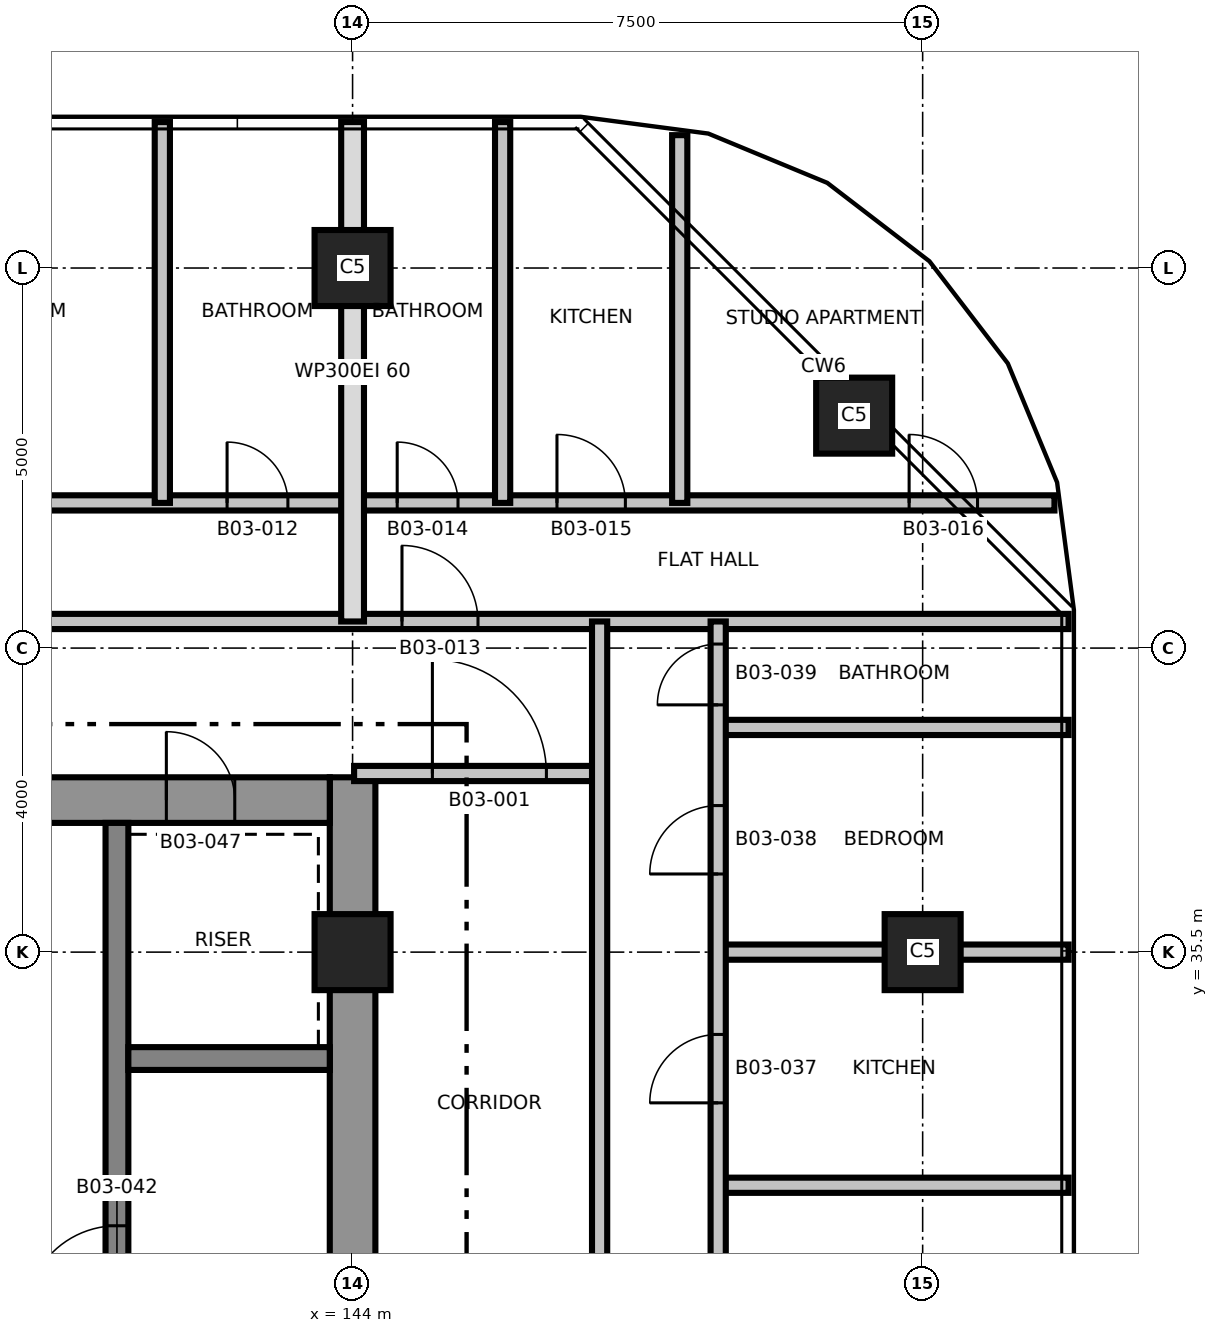
"""IFC4 building model, lengths in metres.
Left out: names, types, materials, properties, quantities, classifications, styles, units other than length and angle.
Written with IfcOpenShell. Run it as: python <this file> out.ifc"""

import sys

from ifc_helpers import new_model, si_unit, direction, frame, frame_2d, origin, origin_2d, place, context, subcontext, project, spatial, rectangle, extrude, element, fill, save


model = new_model("IFC4")
c1 = context("Model", 3, precision=1e-05, world=origin(), true_north=direction((0.0, 1.0)))
c2 = subcontext(c1, "Body", "Model", "MODEL_VIEW")
j1 = project(units=[si_unit("LENGTHUNIT", "METRE"), si_unit("PLANEANGLEUNIT", "RADIAN")], contexts=[c1])
p1 = place(None, origin())
s1 = spatial("IfcSite", under=j1, at=p1, CompositionType="ELEMENT")
p2 = place(p1, origin())
s2 = spatial("IfcBuilding", under=s1, at=p2, CompositionType="ELEMENT")
p3 = place(p2, frame((0.0, 0.0, 52.0)))
s3 = spatial("IfcBuildingStorey", under=s2, at=p3, CompositionType="ELEMENT", Elevation=52.0)
p4 = place(p3, frame((144.0, 24.2, 0.0), z_axis=(0.0, 0.0, 1.0), x_axis=(0.0, 1.0, 0.0)))
e1 = element("IfcWall", 1, at=p4, inside=s3, PredefinedType="SHEAR", context=c2, shape_type="SweptSolid", body=[
    extrude(rectangle(XDim=13.6, YDim=0.6, at=frame_2d((6.8, 0.0))), origin(), (0.0, 0.0, 1.0), 3.7),
])
p5 = place(p3, frame((128.7, 37.5, 0.0), z_axis=(0.0, 0.0, 1.0), x_axis=(1.0, 0.0, 0.0)))
e2 = element("IfcWall", 2, at=p5, inside=s3, PredefinedType="SHEAR", context=c2, shape_type="SweptSolid", body=[
    extrude(rectangle(XDim=15.0, YDim=0.6, at=frame_2d((7.5, 0.0))), origin(), (0.0, 0.0, 1.0), 3.7),
])
p6 = place(p5, frame((9.65, 0.0, 0.0)))
e3 = element("IfcOpeningElement", 3, at=p6, cuts=e2, PredefinedType="OPENING", context=c2, shape_type="SweptSolid", body=[
    extrude(rectangle(XDim=1.5, YDim=2.1, at=frame_2d((0.75, 1.05))), frame((0.0, 0.31, 0.0), z_axis=(0.0, -1.0, 0.0), x_axis=(1.0, 0.0, 0.0)), (0.0, 0.0, 1.0), 0.62),
])
p7 = place(p5, frame((12.85, 0.0, 0.0)))
e4 = element("IfcOpeningElement", 4, at=p7, cuts=e2, PredefinedType="OPENING", context=c2, shape_type="SweptSolid", body=[
    extrude(rectangle(XDim=0.9, YDim=2.1, at=frame_2d((0.45, 1.05))), frame((0.0, 0.31, 0.0), z_axis=(0.0, -1.0, 0.0), x_axis=(1.0, 0.0, 0.0)), (0.0, 0.0, 1.0), 0.62),
])
p8 = place(p5, frame((3.8, 0.0, 0.0)))
e5 = element("IfcOpeningElement", 5, at=p8, cuts=e2, PredefinedType="OPENING", context=c2, shape_type="SweptSolid", body=[
    extrude(rectangle(XDim=0.9, YDim=2.1, at=frame_2d((0.45, 1.05))), frame((0.0, 0.31, 0.0), z_axis=(0.0, -1.0, 0.0), x_axis=(1.0, 0.0, 0.0)), (0.0, 0.0, 1.0), 0.62),
])
p9 = place(p5, frame((6.7, 0.0, 0.0)))
e6 = element("IfcOpeningElement", 6, at=p9, cuts=e2, PredefinedType="OPENING", context=c2, shape_type="SweptSolid", body=[
    extrude(rectangle(XDim=0.9, YDim=2.1, at=frame_2d((0.45, 1.05))), frame((0.0, 0.31, 0.0), z_axis=(0.0, -1.0, 0.0), x_axis=(1.0, 0.0, 0.0)), (0.0, 0.0, 1.0), 0.62),
])
p10 = place(p3, frame((140.9, 24.8, 0.0), z_axis=(0.0, 0.0, 1.0), x_axis=(0.0, 1.0, 0.0)))
e7 = element("IfcWall", 7, at=p10, inside=s3, PredefinedType="SHEAR", context=c2, shape_type="SweptSolid", body=[
    extrude(rectangle(XDim=12.4, YDim=0.3, at=frame_2d((6.2, 0.0))), origin(), (0.0, 0.0, 1.0), 3.7),
])
p11 = place(p10, frame((5.9, 0.0, 0.0)))
e8 = element("IfcOpeningElement", 8, at=p11, cuts=e7, PredefinedType="OPENING", context=c2, shape_type="SweptSolid", body=[
    extrude(rectangle(XDim=1.2, YDim=2.1, at=frame_2d((0.6, 1.05))), frame((0.0, 0.16, 0.0), z_axis=(0.0, -1.0, 0.0), x_axis=(1.0, 0.0, 0.0)), (0.0, 0.0, 1.0), 0.32),
])
p12 = place(p3, frame((141.05, 34.1, 0.0), z_axis=(0.0, 0.0, 1.0), x_axis=(1.0, 0.0, 0.0)))
e9 = element("IfcWall", 9, at=p12, inside=s3, PredefinedType="SHEAR", context=c2, shape_type="SweptSolid", body=[
    extrude(rectangle(XDim=2.65, YDim=0.3, at=frame_2d((1.325, 0.0))), origin(), (0.0, 0.0, 1.0), 3.7),
])
for number, where, z_axis, x_axis in (
    (10, (144.0, 35.5, 0.0), (0.0, 0.0, 1.0), (1.0, 0.0, 0.0)),
    (11, (151.5, 35.5, 0.0), (0.0, 0.0, 1.0), (1.0, 0.0, 0.0)),
    (12, (150.599, 42.558, 0.0), (0.0, 0.0, 1.0), (1.0, 0.0, 0.0)),
    (13, (144.0, 44.5, 0.0), (0.0, 0.0, 1.0), (1.0, 0.0, 0.0)),
):
    element("IfcColumn", number, at=place(p3, frame(where, z_axis=z_axis, x_axis=x_axis)), inside=s3, PredefinedType="COLUMN", context=c2, shape_type="SweptSolid", body=[
        extrude(rectangle(XDim=1.0, YDim=1.0, at=origin_2d()), origin(), (0.0, 0.0, 1.0), 3.7),
    ])
for number, where, z_axis, x_axis in (
    (14, (148.81, 32.433, 0.0), (0.0, 0.0, 1.0), (1.0, 0.0, 0.0)),
    (15, (148.81, 35.5, 0.0), (0.0, 0.0, 1.0), (1.0, 0.0, 0.0)),
):
    element("IfcWall", number, at=place(p3, frame(where, z_axis=z_axis, x_axis=x_axis)), inside=s3, PredefinedType="PARTITIONING", context=c2, shape_type="SweptSolid", body=[
        extrude(rectangle(XDim=4.61, YDim=0.2, at=frame_2d((2.305, 0.0))), origin(), (0.0, 0.0, 1.0), 3.4),
    ])
p13 = place(p3, frame((144.02, 37.85, 0.0), z_axis=(0.0, 0.0, 1.0), x_axis=(1.0, 0.0, 0.0)))
e16 = element("IfcWall", 16, at=p13, inside=s3, PredefinedType="PARTITIONING", context=c2, shape_type="SweptSolid", body=[
    extrude(rectangle(XDim=3.23, YDim=0.2, at=frame_2d((1.615, 0.0))), origin(), (0.0, 0.0, 1.0), 3.4),
])
p14 = place(p13, frame((1.03, 0.0, 0.0)))
e17 = element("IfcOpeningElement", 17, at=p14, cuts=e16, PredefinedType="OPENING", context=c2, shape_type="SweptSolid", body=[
    extrude(rectangle(XDim=1.5, YDim=2.1, at=frame_2d((0.75, 1.05))), frame((0.0, 0.11, 0.0), z_axis=(0.0, -1.0, 0.0), x_axis=(1.0, 0.0, 0.0)), (0.0, 0.0, 1.0), 0.22),
])
p15 = place(p3, frame((148.81, 38.456, 0.0), z_axis=(0.0, 0.0, 1.0), x_axis=(1.0, 0.0, 0.0)))
e18 = element("IfcWall", 18, at=p15, inside=s3, PredefinedType="PARTITIONING", context=c2, shape_type="SweptSolid", body=[
    extrude(rectangle(XDim=4.61, YDim=0.2, at=frame_2d((2.305, 0.0))), origin(), (0.0, 0.0, 1.0), 3.4),
])
p16 = place(p3, frame((119.58, 39.85, 0.0), z_axis=(0.0, 0.0, 1.0), x_axis=(1.0, 0.0, 0.0)))
e19 = element("IfcWall", 19, at=p16, inside=s3, PredefinedType="PARTITIONING", context=c2, shape_type="SweptSolid", body=[
    extrude(rectangle(XDim=33.84, YDim=0.2, at=frame_2d((16.92, 0.0))), origin(), (0.0, 0.0, 1.0), 3.4),
])
p17 = place(p16, frame((15.27, 0.0, 0.0)))
e20 = element("IfcOpeningElement", 20, at=p17, cuts=e19, PredefinedType="OPENING", context=c2, shape_type="SweptSolid", body=[
    extrude(rectangle(XDim=1.0, YDim=2.1, at=frame_2d((0.5, 1.05))), frame((0.0, 0.11, 0.0), z_axis=(0.0, -1.0, 0.0), x_axis=(1.0, 0.0, 0.0)), (0.0, 0.0, 1.0), 0.22),
])
p18 = place(p16, frame((25.07, 0.0, 0.0)))
e21 = element("IfcOpeningElement", 21, at=p18, cuts=e19, PredefinedType="OPENING", context=c2, shape_type="SweptSolid", body=[
    extrude(rectangle(XDim=1.0, YDim=2.1, at=frame_2d((0.5, 1.05))), frame((0.0, 0.11, 0.0), z_axis=(0.0, -1.0, 0.0), x_axis=(1.0, 0.0, 0.0)), (0.0, 0.0, 1.0), 0.22),
])
p19 = place(p3, frame((119.766, 41.41, 0.0), z_axis=(0.0, 0.0, 1.0), x_axis=(1.0, 0.0, 0.0)))
e22 = element("IfcWall", 22, at=p19, inside=s3, PredefinedType="PARTITIONING", context=c2, shape_type="SweptSolid", body=[
    extrude(rectangle(XDim=33.468, YDim=0.2, at=frame_2d((16.734, 0.0))), origin(), (0.0, 0.0, 1.0), 3.4),
])
p20 = place(p19, frame((1.017, 0.0, 0.0)))
e23 = element("IfcOpeningElement", 23, at=p20, cuts=e22, PredefinedType="OPENING", context=c2, shape_type="SweptSolid", body=[
    extrude(rectangle(XDim=0.9, YDim=2.1, at=frame_2d((0.45, 1.05))), frame((0.0, 0.11, 0.0), z_axis=(0.0, -1.0, 0.0), x_axis=(1.0, 0.0, 0.0)), (0.0, 0.0, 1.0), 0.22),
])
p21 = place(p19, frame((4.888, 0.0, 0.0)))
e24 = element("IfcOpeningElement", 24, at=p21, cuts=e22, PredefinedType="OPENING", context=c2, shape_type="SweptSolid", body=[
    extrude(rectangle(XDim=0.9, YDim=2.1, at=frame_2d((0.45, 1.05))), frame((0.0, 0.11, 0.0), z_axis=(0.0, -1.0, 0.0), x_axis=(1.0, 0.0, 0.0)), (0.0, 0.0, 1.0), 0.22),
])
p22 = place(p19, frame((7.835, 0.0, 0.0)))
e25 = element("IfcOpeningElement", 25, at=p22, cuts=e22, PredefinedType="OPENING", context=c2, shape_type="SweptSolid", body=[
    extrude(rectangle(XDim=0.8, YDim=2.1, at=frame_2d((0.4, 1.05))), frame((0.0, 0.11, 0.0), z_axis=(0.0, -1.0, 0.0), x_axis=(1.0, 0.0, 0.0)), (0.0, 0.0, 1.0), 0.22),
])
p23 = place(p19, frame((11.251, 0.0, 0.0)))
e26 = element("IfcOpeningElement", 26, at=p23, cuts=e22, PredefinedType="OPENING", context=c2, shape_type="SweptSolid", body=[
    extrude(rectangle(XDim=0.9, YDim=2.1, at=frame_2d((0.45, 1.05))), frame((0.0, 0.11, 0.0), z_axis=(0.0, -1.0, 0.0), x_axis=(1.0, 0.0, 0.0)), (0.0, 0.0, 1.0), 0.22),
])
p24 = place(p19, frame((15.001, 0.0, 0.0)))
e27 = element("IfcOpeningElement", 27, at=p24, cuts=e22, PredefinedType="OPENING", context=c2, shape_type="SweptSolid", body=[
    extrude(rectangle(XDim=0.9, YDim=2.1, at=frame_2d((0.45, 1.05))), frame((0.0, 0.11, 0.0), z_axis=(0.0, -1.0, 0.0), x_axis=(1.0, 0.0, 0.0)), (0.0, 0.0, 1.0), 0.22),
])
p25 = place(p19, frame((18.783, 0.0, 0.0)))
e28 = element("IfcOpeningElement", 28, at=p25, cuts=e22, PredefinedType="OPENING", context=c2, shape_type="SweptSolid", body=[
    extrude(rectangle(XDim=0.9, YDim=2.1, at=frame_2d((0.45, 1.05))), frame((0.0, 0.11, 0.0), z_axis=(0.0, -1.0, 0.0), x_axis=(1.0, 0.0, 0.0)), (0.0, 0.0, 1.0), 0.22),
])
p26 = place(p19, frame((22.583, 0.0, 0.0)))
e29 = element("IfcOpeningElement", 29, at=p26, cuts=e22, PredefinedType="OPENING", context=c2, shape_type="SweptSolid", body=[
    extrude(rectangle(XDim=0.8, YDim=2.1, at=frame_2d((0.4, 1.05))), frame((0.0, 0.11, 0.0), z_axis=(0.0, -1.0, 0.0), x_axis=(1.0, 0.0, 0.0)), (0.0, 0.0, 1.0), 0.22),
])
p27 = place(p19, frame((24.821, 0.0, 0.0)))
e30 = element("IfcOpeningElement", 30, at=p27, cuts=e22, PredefinedType="OPENING", context=c2, shape_type="SweptSolid", body=[
    extrude(rectangle(XDim=0.8, YDim=2.1, at=frame_2d((0.4, 1.05))), frame((0.0, 0.11, 0.0), z_axis=(0.0, -1.0, 0.0), x_axis=(1.0, 0.0, 0.0)), (0.0, 0.0, 1.0), 0.22),
])
p28 = place(p19, frame((26.923, 0.0, 0.0)))
e31 = element("IfcOpeningElement", 31, at=p28, cuts=e22, PredefinedType="OPENING", context=c2, shape_type="SweptSolid", body=[
    extrude(rectangle(XDim=0.9, YDim=2.1, at=frame_2d((0.45, 1.05))), frame((0.0, 0.11, 0.0), z_axis=(0.0, -1.0, 0.0), x_axis=(1.0, 0.0, 0.0)), (0.0, 0.0, 1.0), 0.22),
])
p29 = place(p19, frame((31.556, 0.0, 0.0)))
e32 = element("IfcOpeningElement", 32, at=p29, cuts=e22, PredefinedType="OPENING", context=c2, shape_type="SweptSolid", body=[
    extrude(rectangle(XDim=0.9, YDim=2.1, at=frame_2d((0.45, 1.05))), frame((0.0, 0.11, 0.0), z_axis=(0.0, -1.0, 0.0), x_axis=(1.0, 0.0, 0.0)), (0.0, 0.0, 1.0), 0.22),
])
p30 = place(p3, frame((141.497, 41.41, 0.0), z_axis=(0.0, 0.0, 1.0), x_axis=(0.0, 1.0, 0.0)))
e33 = element("IfcWall", 33, at=p30, inside=s3, PredefinedType="PARTITIONING", context=c2, shape_type="SweptSolid", body=[
    extrude(rectangle(XDim=5.01, YDim=0.2, at=frame_2d((2.505, 0.0))), origin(), (0.0, 0.0, 1.0), 3.4),
])
p31 = place(p3, frame((144.0, 39.85, 0.0), z_axis=(0.0, 0.0, 1.0), x_axis=(0.0, 1.0, 0.0)))
e34 = element("IfcWall", 34, at=p31, inside=s3, PredefinedType="PARTITIONING", context=c2, shape_type="SweptSolid", body=[
    extrude(rectangle(XDim=6.57, YDim=0.3, at=frame_2d((3.285, 0.0))), origin(), (0.0, 0.0, 1.0), 3.4),
])
p32 = place(p3, frame((145.974, 41.41, 0.0), z_axis=(0.0, 0.0, 1.0), x_axis=(0.0, 1.0, 0.0)))
e35 = element("IfcWall", 35, at=p32, inside=s3, PredefinedType="PARTITIONING", context=c2, shape_type="SweptSolid", body=[
    extrude(rectangle(XDim=5.01, YDim=0.2, at=frame_2d((2.505, 0.0))), origin(), (0.0, 0.0, 1.0), 3.4),
])
p33 = place(p3, frame((147.25, 22.15, 0.0), z_axis=(0.0, 0.0, 1.0), x_axis=(0.0, 1.0, 0.0)))
e36 = element("IfcWall", 36, at=p33, inside=s3, PredefinedType="PARTITIONING", context=c2, shape_type="SweptSolid", body=[
    extrude(rectangle(XDim=17.7, YDim=0.2, at=frame_2d((8.85, 0.0))), origin(), (0.0, 0.0, 1.0), 3.4),
])
p34 = place(p33, frame((2.65, 0.0, 0.0)))
e37 = element("IfcOpeningElement", 37, at=p34, cuts=e36, PredefinedType="OPENING", context=c2, shape_type="SweptSolid", body=[
    extrude(rectangle(XDim=1.0, YDim=2.1, at=frame_2d((0.5, 1.05))), frame((0.0, 0.11, 0.0), z_axis=(0.0, -1.0, 0.0), x_axis=(1.0, 0.0, 0.0)), (0.0, 0.0, 1.0), 0.22),
])
p35 = place(p3, frame((148.304, 41.41, 0.0), z_axis=(0.0, 0.0, 1.0), x_axis=(0.0, 1.0, 0.0)))
e38 = element("IfcWall", 38, at=p35, inside=s3, PredefinedType="PARTITIONING", context=c2, shape_type="SweptSolid", body=[
    extrude(rectangle(XDim=4.838, YDim=0.2, at=frame_2d((2.419, 0.0))), origin(), (0.0, 0.0, 1.0), 3.4),
])
p36 = place(p3, frame((148.81, 22.15, 0.0), z_axis=(0.0, 0.0, 1.0), x_axis=(0.0, 1.0, 0.0)))
e39 = element("IfcWall", 39, at=p36, inside=s3, PredefinedType="PARTITIONING", context=c2, shape_type="SweptSolid", body=[
    extrude(rectangle(XDim=17.7, YDim=0.2, at=frame_2d((8.85, 0.0))), origin(), (0.0, 0.0, 1.0), 3.4),
])
p37 = place(p36, frame((1.725, 0.0, 0.0)))
e40 = element("IfcOpeningElement", 40, at=p37, cuts=e39, PredefinedType="OPENING", context=c2, shape_type="SweptSolid", body=[
    extrude(rectangle(XDim=0.9, YDim=2.1, at=frame_2d((0.45, 1.05))), frame((0.0, 0.11, 0.0), z_axis=(0.0, -1.0, 0.0), x_axis=(1.0, 0.0, 0.0)), (0.0, 0.0, 1.0), 0.22),
])
p38 = place(p36, frame((6.867, 0.0, 0.0)))
e41 = element("IfcOpeningElement", 41, at=p38, cuts=e39, PredefinedType="OPENING", context=c2, shape_type="SweptSolid", body=[
    extrude(rectangle(XDim=0.9, YDim=2.1, at=frame_2d((0.45, 1.05))), frame((0.0, 0.11, 0.0), z_axis=(0.0, -1.0, 0.0), x_axis=(1.0, 0.0, 0.0)), (0.0, 0.0, 1.0), 0.22),
])
p39 = place(p36, frame((11.367, 0.0, 0.0)))
e42 = element("IfcOpeningElement", 42, at=p39, cuts=e39, PredefinedType="OPENING", context=c2, shape_type="SweptSolid", body=[
    extrude(rectangle(XDim=0.9, YDim=2.1, at=frame_2d((0.45, 1.05))), frame((0.0, 0.11, 0.0), z_axis=(0.0, -1.0, 0.0), x_axis=(1.0, 0.0, 0.0)), (0.0, 0.0, 1.0), 0.22),
])
p40 = place(p36, frame((14.378, 0.0, 0.0)))
e43 = element("IfcOpeningElement", 43, at=p40, cuts=e39, PredefinedType="OPENING", context=c2, shape_type="SweptSolid", body=[
    extrude(rectangle(XDim=0.9, YDim=2.1, at=frame_2d((0.45, 1.05))), frame((0.0, 0.11, 0.0), z_axis=(0.0, -1.0, 0.0), x_axis=(1.0, 0.0, 0.0)), (0.0, 0.0, 1.0), 0.22),
])
p41 = place(p36, frame((16.603, 0.0, 0.0)))
e44 = element("IfcOpeningElement", 44, at=p41, cuts=e39, PredefinedType="OPENING", context=c2, shape_type="SweptSolid", body=[
    extrude(rectangle(XDim=0.8, YDim=2.1, at=frame_2d((0.4, 1.05))), frame((0.0, 0.11, 0.0), z_axis=(0.0, -1.0, 0.0), x_axis=(1.0, 0.0, 0.0)), (0.0, 0.0, 1.0), 0.22),
])
p42 = place(p14, origin())
e45 = element("IfcDoor", 45, at=p42, inside=s3, OperationType="SINGLE_SWING_LEFT", PredefinedType="DOOR", context=c2, shape_type="SweptSolid", body=[
    extrude(rectangle(XDim=1.5, YDim=2.1, at=frame_2d((0.75, 1.05))), frame((0.0, 0.025, 0.0), z_axis=(0.0, -1.0, 0.0), x_axis=(1.0, 0.0, 0.0)), (0.0, 0.0, 1.0), 0.05),
])
fill(e17, e45)
p43 = place(p26, origin())
e46 = element("IfcDoor", 46, at=p43, inside=s3, OperationType="SINGLE_SWING_RIGHT", PredefinedType="DOOR", context=c2, shape_type="SweptSolid", body=[
    extrude(rectangle(XDim=0.8, YDim=2.1, at=frame_2d((0.4, 1.05))), frame((0.0, 0.025, 0.0), z_axis=(0.0, -1.0, 0.0), x_axis=(1.0, 0.0, 0.0)), (0.0, 0.0, 1.0), 0.05),
])
fill(e29, e46)
p44 = place(p18, origin())
e47 = element("IfcDoor", 47, at=p44, inside=s3, OperationType="SINGLE_SWING_LEFT", PredefinedType="DOOR", context=c2, shape_type="SweptSolid", body=[
    extrude(rectangle(XDim=1.0, YDim=2.1, at=frame_2d((0.5, 1.05))), frame((0.0, 0.025, 0.0), z_axis=(0.0, -1.0, 0.0), x_axis=(1.0, 0.0, 0.0)), (0.0, 0.0, 1.0), 0.05),
])
fill(e21, e47)
p45 = place(p27, origin())
e48 = element("IfcDoor", 48, at=p45, inside=s3, OperationType="SINGLE_SWING_RIGHT", PredefinedType="DOOR", context=c2, shape_type="SweptSolid", body=[
    extrude(rectangle(XDim=0.8, YDim=2.1, at=frame_2d((0.4, 1.05))), frame((0.0, 0.025, 0.0), z_axis=(0.0, -1.0, 0.0), x_axis=(1.0, 0.0, 0.0)), (0.0, 0.0, 1.0), 0.05),
])
fill(e30, e48)
p46 = place(p28, origin())
e49 = element("IfcDoor", 49, at=p46, inside=s3, OperationType="SINGLE_SWING_LEFT", PredefinedType="DOOR", context=c2, shape_type="SweptSolid", body=[
    extrude(rectangle(XDim=0.9, YDim=2.1, at=frame_2d((0.45, 1.05))), frame((0.0, 0.025, 0.0), z_axis=(0.0, -1.0, 0.0), x_axis=(1.0, 0.0, 0.0)), (0.0, 0.0, 1.0), 0.05),
])
fill(e31, e49)
p47 = place(p29, origin())
e50 = element("IfcDoor", 50, at=p47, inside=s3, OperationType="SINGLE_SWING_RIGHT", PredefinedType="DOOR", context=c2, shape_type="SweptSolid", body=[
    extrude(rectangle(XDim=0.9, YDim=2.1, at=frame_2d((0.45, 1.05))), frame((0.0, 0.025, 0.0), z_axis=(0.0, -1.0, 0.0), x_axis=(1.0, 0.0, 0.0)), (0.0, 0.0, 1.0), 0.05),
])
fill(e32, e50)
p48 = place(p39, origin())
e51 = element("IfcDoor", 51, at=p48, inside=s3, OperationType="SINGLE_SWING_LEFT", PredefinedType="DOOR", context=c2, shape_type="SweptSolid", body=[
    extrude(rectangle(XDim=0.9, YDim=2.1, at=frame_2d((0.45, 1.05))), frame((0.0, 0.025, 0.0), z_axis=(0.0, -1.0, 0.0), x_axis=(1.0, 0.0, 0.0)), (0.0, 0.0, 1.0), 0.05),
])
fill(e42, e51)
p49 = place(p40, origin())
e52 = element("IfcDoor", 52, at=p49, inside=s3, OperationType="SINGLE_SWING_RIGHT", PredefinedType="DOOR", context=c2, shape_type="SweptSolid", body=[
    extrude(rectangle(XDim=0.9, YDim=2.1, at=frame_2d((0.45, 1.05))), frame((0.0, 0.025, 0.0), z_axis=(0.0, -1.0, 0.0), x_axis=(1.0, 0.0, 0.0)), (0.0, 0.0, 1.0), 0.05),
])
fill(e43, e52)
p50 = place(p41, origin())
e53 = element("IfcDoor", 53, at=p50, inside=s3, OperationType="SINGLE_SWING_LEFT", PredefinedType="DOOR", context=c2, shape_type="SweptSolid", body=[
    extrude(rectangle(XDim=0.8, YDim=2.1, at=frame_2d((0.4, 1.05))), frame((0.0, 0.025, 0.0), z_axis=(0.0, -1.0, 0.0), x_axis=(1.0, 0.0, 0.0)), (0.0, 0.0, 1.0), 0.05),
])
fill(e44, e53)
p51 = place(p11, origin())
e54 = element("IfcDoor", 54, at=p51, inside=s3, OperationType="SINGLE_SWING_RIGHT", PredefinedType="DOOR", context=c2, shape_type="SweptSolid", body=[
    extrude(rectangle(XDim=1.2, YDim=2.1, at=frame_2d((0.6, 1.05))), frame((0.0, 0.025, 0.0), z_axis=(0.0, -1.0, 0.0), x_axis=(1.0, 0.0, 0.0)), (0.0, 0.0, 1.0), 0.05),
])
fill(e8, e54)
p52 = place(p7, origin())
e55 = element("IfcDoor", 55, at=p52, inside=s3, OperationType="SINGLE_SWING_RIGHT", PredefinedType="DOOR", context=c2, shape_type="SweptSolid", body=[
    extrude(rectangle(XDim=0.9, YDim=2.1, at=frame_2d((0.45, 1.05))), frame((0.0, 0.025, 0.0), z_axis=(0.0, -1.0, 0.0), x_axis=(1.0, 0.0, 0.0)), (0.0, 0.0, 1.0), 0.05),
])
fill(e4, e55)
save(model, sys.argv[1])
